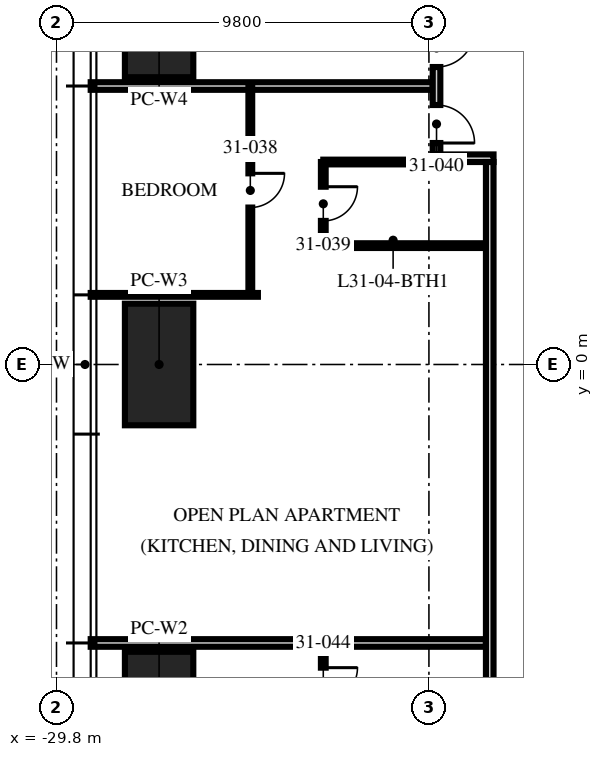
"""IFC4 building model, lengths in metres.
Left out: names, types, materials, properties, quantities, classifications, styles, units other than length and angle.
Written with IfcOpenShell. Run it as: python <this file> out.ifc"""

import sys

from ifc_helpers import new_model, si_unit, direction, frame, frame_2d, origin, origin_2d, place, context, subcontext, project, spatial, rectangle, extrude, element, fill, save


model = new_model("IFC4")
c1 = context("Model", 3, precision=1e-05, world=origin(), true_north=direction((0.0, 1.0)))
c2 = subcontext(c1, "Body", "Model", "MODEL_VIEW")
j1 = project(units=[si_unit("LENGTHUNIT", "METRE"), si_unit("PLANEANGLEUNIT", "RADIAN")], contexts=[c1])
p1 = place(None, origin())
s1 = spatial("IfcSite", under=j1, at=p1, CompositionType="ELEMENT")
p2 = place(p1, origin())
s2 = spatial("IfcBuilding", under=s1, at=p2, CompositionType="ELEMENT")
p3 = place(p2, frame((0.0, 0.0, 126.0)))
s3 = spatial("IfcBuildingStorey", under=s2, at=p3, CompositionType="ELEMENT", Elevation=126.0)
for number, where, z_axis, x_axis in (
    (1, (-27.1, -9.16, 0.0), (0.0, 0.0, 1.0), (0.0, 1.0, 0.0)),
    (2, (-27.1, 0.0, 0.0), (0.0, 0.0, 1.0), (0.0, 1.0, 0.0)),
    (3, (-27.1, 9.16, 0.0), (0.0, 0.0, 1.0), (0.0, 1.0, 0.0)),
):
    element("IfcColumn", number, at=place(p3, frame(where, z_axis=z_axis, x_axis=x_axis)), inside=s3, PredefinedType="COLUMN", context=c2, shape_type="SweptSolid", body=[
        extrude(rectangle(XDim=3.2, YDim=1.8, at=origin_2d()), origin(), (0.0, 0.0, 1.0), 3.75),
    ])
p4 = place(p3, frame((-19.9, 7.328, 0.0), z_axis=(0.0, 0.0, 1.0), x_axis=(-1.0, 0.0, 0.0)))
e4 = element("IfcWall", 4, at=p4, inside=s3, PredefinedType="PARTITIONING", context=c2, shape_type="SweptSolid", body=[
    extrude(rectangle(XDim=9.0, YDim=0.2, at=frame_2d((4.5, 0.0))), origin(), (0.0, 0.0, 1.0), 2.81),
])
p5 = place(p3, frame((-24.5, 1.832, 0.0), z_axis=(0.0, 0.0, 1.0), x_axis=(-1.0, 0.0, 0.0)))
e5 = element("IfcWall", 5, at=p5, inside=s3, PredefinedType="PARTITIONING", context=c2, shape_type="SweptSolid", body=[
    extrude(rectangle(XDim=4.4, YDim=0.1, at=frame_2d((2.2, 0.0))), origin(), (0.0, 0.0, 1.0), 2.81),
])
p6 = place(p3, frame((-18.5, -7.328, 0.0), z_axis=(0.0, 0.0, 1.0), x_axis=(-1.0, 0.0, 0.0)))
e6 = element("IfcWall", 6, at=p6, inside=s3, PredefinedType="PARTITIONING", context=c2, shape_type="SweptSolid", body=[
    extrude(rectangle(XDim=10.4, YDim=0.2, at=frame_2d((5.2, 0.0))), origin(), (0.0, 0.0, 1.0), 2.81),
])
p7 = place(p3, frame((-24.7, 7.328, 0.0), z_axis=(0.0, 0.0, 1.0), x_axis=(0.0, -1.0, 0.0)))
e7 = element("IfcWall", 7, at=p7, inside=s3, PredefinedType="PARTITIONING", context=c2, shape_type="SweptSolid", body=[
    extrude(rectangle(XDim=5.496, YDim=0.1, at=frame_2d((2.748, 0.0))), origin(), (0.0, 0.0, 1.0), 2.81),
])
p8 = place(p7, frame((2.298, 0.0, 0.0)))
e8 = element("IfcOpeningElement", 8, at=p8, cuts=e7, PredefinedType="OPENING", context=c2, shape_type="SweptSolid", body=[
    extrude(rectangle(XDim=0.9, YDim=2.1, at=frame_2d((0.45, 1.05))), frame((0.0, 0.06, 0.0), z_axis=(0.0, -1.0, 0.0), x_axis=(1.0, 0.0, 0.0)), (0.0, 0.0, 1.0), 0.12),
])
p9 = place(p3, frame((-22.78, 5.328, 0.0), z_axis=(0.0, 0.0, 1.0), x_axis=(0.0, -1.0, 0.0)))
e9 = element("IfcWall", 9, at=p9, inside=s3, PredefinedType="PARTITIONING", context=c2, shape_type="SweptSolid", body=[
    extrude(rectangle(XDim=2.2, YDim=0.125, at=frame_2d((1.1, 0.0))), origin(), (0.0, 0.0, 1.0), 2.81),
])
p10 = place(p9, frame((0.65, 0.0, 0.0)))
e10 = element("IfcOpeningElement", 10, at=p10, cuts=e9, PredefinedType="OPENING", context=c2, shape_type="SweptSolid", body=[
    extrude(rectangle(XDim=0.9, YDim=2.1, at=frame_2d((0.45, 1.05))), frame((0.0, 0.073, 0.0), z_axis=(0.0, -1.0, 0.0), x_axis=(1.0, 0.0, 0.0)), (0.0, 0.0, 1.0), 0.145),
])
p11 = place(p3, frame((-19.97, 5.328, 0.0), z_axis=(0.0, 0.0, 1.0), x_axis=(-1.0, 0.0, 0.0)))
e11 = element("IfcWall", 11, at=p11, inside=s3, PredefinedType="PARTITIONING", context=c2, shape_type="SweptSolid", body=[
    extrude(rectangle(XDim=2.81, YDim=0.125, at=frame_2d((1.405, 0.0))), origin(), (0.0, 0.0, 1.0), 3.5),
])
p12 = place(p3, frame((-18.5, 3.128, 0.0), z_axis=(0.0, 0.0, 1.0), x_axis=(-1.0, 0.0, 0.0)))
e12 = element("IfcWall", 12, at=p12, inside=s3, PredefinedType="PARTITIONING", context=c2, shape_type="SweptSolid", body=[
    extrude(rectangle(XDim=4.28, YDim=0.125, at=frame_2d((2.14, 0.0))), origin(), (0.0, 0.0, 1.0), 3.5),
])
p13 = place(p3, frame((-22.78, -7.328, 0.0), z_axis=(0.0, 0.0, 1.0), x_axis=(0.0, -1.0, 0.0)))
e13 = element("IfcWall", 13, at=p13, inside=s3, PredefinedType="PARTITIONING", context=c2, shape_type="SweptSolid", body=[
    extrude(rectangle(XDim=2.2, YDim=0.125, at=frame_2d((1.1, 0.0))), origin(), (0.0, 0.0, 1.0), 2.7),
])
p14 = place(p13, frame((0.65, 0.0, 0.0)))
e14 = element("IfcOpeningElement", 14, at=p14, cuts=e13, PredefinedType="OPENING", context=c2, shape_type="SweptSolid", body=[
    extrude(rectangle(XDim=0.9, YDim=2.1, at=frame_2d((0.45, 1.05))), frame((0.0, 0.073, 0.0), z_axis=(0.0, -1.0, 0.0), x_axis=(1.0, 0.0, 0.0)), (0.0, 0.0, 1.0), 0.145),
])
p15 = place(p3, frame((-18.3, 5.428, 0.0), z_axis=(0.0, 0.0, 1.0), x_axis=(-1.0, 0.0, 0.0)))
e15 = element("IfcWall", 15, at=p15, inside=s3, PredefinedType="PARTITIONING", context=c2, shape_type="SweptSolid", body=[
    extrude(rectangle(XDim=1.6, YDim=0.2, at=frame_2d((0.8, 0.0))), origin(), (0.0, 0.0, 1.0), 3.5),
])
p16 = place(p3, frame((-19.8, 9.128, 0.0), z_axis=(0.0, 0.0, 1.0), x_axis=(0.0, -1.0, 0.0)))
e16 = element("IfcWall", 16, at=p16, inside=s3, PredefinedType="PARTITIONING", context=c2, shape_type="SweptSolid", body=[
    extrude(rectangle(XDim=3.6, YDim=0.2, at=frame_2d((1.8, 0.0))), origin(), (0.0, 0.0, 1.0), 2.7),
])
p17 = place(p16, frame((0.3, 0.0, 0.0)))
e17 = element("IfcOpeningElement", 17, at=p17, cuts=e16, PredefinedType="OPENING", context=c2, shape_type="SweptSolid", body=[
    extrude(rectangle(XDim=1.0, YDim=2.2, at=frame_2d((0.5, 1.1))), frame((0.0, 0.11, 0.0), z_axis=(0.0, -1.0, 0.0), x_axis=(1.0, 0.0, 0.0)), (0.0, 0.0, 1.0), 0.22),
])
p18 = place(p16, frame((2.3, 0.0, 0.0)))
e18 = element("IfcOpeningElement", 18, at=p18, cuts=e16, PredefinedType="OPENING", context=c2, shape_type="SweptSolid", body=[
    extrude(rectangle(XDim=1.0, YDim=2.2, at=frame_2d((0.5, 1.1))), frame((0.0, 0.11, 0.0), z_axis=(0.0, -1.0, 0.0), x_axis=(1.0, 0.0, 0.0)), (0.0, 0.0, 1.0), 0.22),
])
p19 = place(p3, frame((-18.4, 5.328, 0.0), z_axis=(0.0, 0.0, 1.0), x_axis=(0.0, -1.0, 0.0)))
e19 = element("IfcWall", 19, at=p19, inside=s3, PredefinedType="PARTITIONING", context=c2, shape_type="SweptSolid", body=[
    extrude(rectangle(XDim=23.628, YDim=0.2, at=frame_2d((11.814, 0.0))), origin(), (0.0, 0.0, 1.0), 2.3),
])
p20 = place(p19, frame((21.926, 0.0, 0.0)))
e20 = element("IfcOpeningElement", 20, at=p20, cuts=e19, PredefinedType="OPENING", context=c2, shape_type="SweptSolid", body=[
    extrude(rectangle(XDim=1.0, YDim=2.2, at=frame_2d((0.5, 1.1))), frame((0.0, 0.11, 0.0), z_axis=(0.0, -1.0, 0.0), x_axis=(1.0, 0.0, 0.0)), (0.0, 0.0, 1.0), 0.22),
])
p21 = place(p17, origin())
e21 = element("IfcDoor", 21, at=p21, inside=s3, OperationType="SINGLE_SWING_LEFT", PredefinedType="DOOR", context=c2, shape_type="SweptSolid", body=[
    extrude(rectangle(XDim=1.0, YDim=2.2, at=frame_2d((0.5, 1.1))), frame((0.0, 0.025, 0.0), z_axis=(0.0, -1.0, 0.0), x_axis=(1.0, 0.0, 0.0)), (0.0, 0.0, 1.0), 0.05),
])
fill(e17, e21)
p22 = place(p8, origin())
e22 = element("IfcDoor", 22, at=p22, inside=s3, OperationType="SINGLE_SWING_LEFT", PredefinedType="DOOR", context=c2, shape_type="SweptSolid", body=[
    extrude(rectangle(XDim=0.9, YDim=2.1, at=frame_2d((0.45, 1.05))), frame((0.0, 0.025, 0.0), z_axis=(0.0, -1.0, 0.0), x_axis=(1.0, 0.0, 0.0)), (0.0, 0.0, 1.0), 0.05),
])
fill(e8, e22)
p23 = place(p10, origin())
e23 = element("IfcDoor", 23, at=p23, inside=s3, OperationType="SINGLE_SWING_LEFT", PredefinedType="DOOR", context=c2, shape_type="SweptSolid", body=[
    extrude(rectangle(XDim=0.9, YDim=2.1, at=frame_2d((0.45, 1.05))), frame((0.0, 0.025, 0.0), z_axis=(0.0, -1.0, 0.0), x_axis=(1.0, 0.0, 0.0)), (0.0, 0.0, 1.0), 0.05),
])
fill(e10, e23)
p24 = place(p18, origin())
e24 = element("IfcDoor", 24, at=p24, inside=s3, OperationType="SINGLE_SWING_RIGHT", PredefinedType="DOOR", context=c2, shape_type="SweptSolid", body=[
    extrude(rectangle(XDim=1.0, YDim=2.2, at=frame_2d((0.5, 1.1))), frame((0.0, 0.025, 0.0), z_axis=(0.0, -1.0, 0.0), x_axis=(1.0, 0.0, 0.0)), (0.0, 0.0, 1.0), 0.05),
])
fill(e18, e24)
p25 = place(p14, origin())
e25 = element("IfcDoor", 25, at=p25, inside=s3, OperationType="SINGLE_SWING_LEFT", PredefinedType="DOOR", context=c2, shape_type="SweptSolid", body=[
    extrude(rectangle(XDim=0.9, YDim=2.1, at=frame_2d((0.45, 1.05))), frame((0.0, 0.025, 0.0), z_axis=(0.0, -1.0, 0.0), x_axis=(1.0, 0.0, 0.0)), (0.0, 0.0, 1.0), 0.05),
])
fill(e14, e25)
save(model, sys.argv[1])
